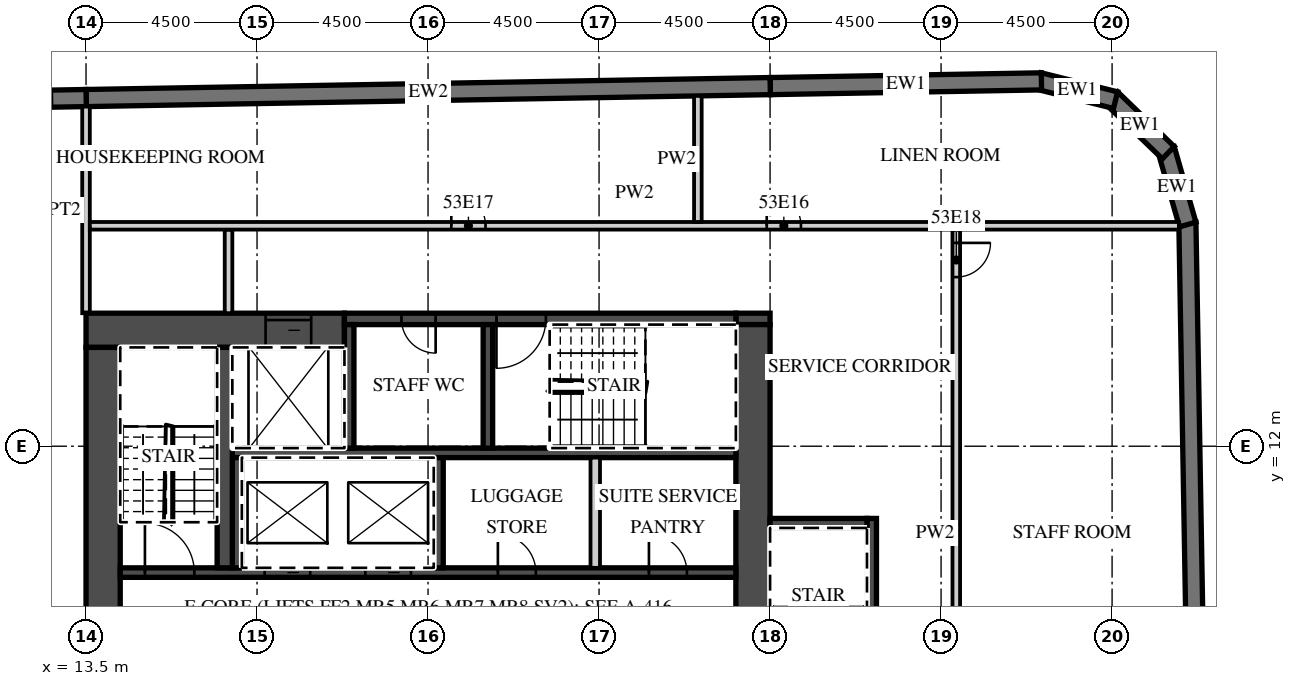
"""IFC4 building model, lengths in metres.
Left out: names, types, materials, properties, quantities, classifications, styles, units other than length and angle.
Written with IfcOpenShell. Run it as: python <this file> out.ifc"""

import sys

from ifc_helpers import new_model, si_unit, direction, frame, frame_2d, origin, place, context, subcontext, project, spatial, polyline, rectangle, outline, extrude, element, fill, save


model = new_model("IFC4")
c1 = context("Model", 3, precision=1e-05, world=origin(), true_north=direction((0.0, 1.0)))
c2 = subcontext(c1, "Body", "Model", "MODEL_VIEW")
j1 = project(units=[si_unit("LENGTHUNIT", "METRE"), si_unit("PLANEANGLEUNIT", "RADIAN")], contexts=[c1])
p1 = place(None, origin())
s1 = spatial("IfcSite", under=j1, at=p1, CompositionType="ELEMENT")
p2 = place(p1, origin())
s2 = spatial("IfcBuilding", under=s1, at=p2, CompositionType="ELEMENT")
p3 = place(p2, frame((0.0, 0.0, 221.0)))
s3 = spatial("IfcBuildingStorey", under=s2, at=p3, CompositionType="ELEMENT", Elevation=221.0)
p4 = place(p3, frame((43.057, -15.103, 0.0), z_axis=(0.0, 0.0, 1.0), x_axis=(-0.017452408953, 0.999847695112, 0.0)))
e1 = element("IfcWall", 1, at=p4, inside=s3, PredefinedType="SOLIDWALL", context=c2, shape_type="SweptSolid", body=[
    extrude(rectangle(XDim=33.0, YDim=0.45, at=frame_2d((16.5, 0.0))), origin(), (0.0, 0.0, 1.0), 3.02),
])
p5 = place(p3, frame((42.49, 17.833, 0.0), z_axis=(0.0, 0.0, 1.0), x_axis=(-0.275546368831, 0.961287781377, 0.0)))
e2 = element("IfcWall", 2, at=p5, inside=s3, PredefinedType="SOLIDWALL", context=c2, shape_type="SweptSolid", body=[
    extrude(outline(polyline([(0.0, -0.225), (2.071, -0.225), (1.95, 0.225), (0.121, 0.225), (0.0, -0.225)])), origin(), (0.0, 0.0, 1.0), 3.02),
])
p6 = place(p3, frame((41.979, 19.724, 0.0), z_axis=(0.0, 0.0, 1.0), x_axis=(-0.719379111448, 0.694617660308, 0.0)))
e3 = element("IfcWall", 3, at=p6, inside=s3, PredefinedType="SOLIDWALL", context=c2, shape_type="SweptSolid", body=[
    extrude(outline(polyline([(0.0, -0.225), (2.071, -0.225), (1.95, 0.225), (0.121, 0.225), (0.0, -0.225)])), origin(), (0.0, 0.0, 1.0), 3.02),
])
p7 = place(p3, frame((40.591, 21.106, 0.0), z_axis=(0.0, 0.0, 1.0), x_axis=(-0.970287979719, 0.241952963225, 0.0)))
e4 = element("IfcWall", 4, at=p7, inside=s3, PredefinedType="SOLIDWALL", context=c2, shape_type="SweptSolid", body=[
    extrude(outline(polyline([(0.0, -0.225), (2.071, -0.225), (1.95, 0.225), (0.121, 0.225), (0.0, -0.225)])), origin(), (0.0, 0.0, 1.0), 3.02),
])
p8 = place(p3, frame((38.641, 21.6, 0.0), z_axis=(0.0, 0.0, 1.0), x_axis=(-0.999847245074, -0.017478172627, 0.0)))
e5 = element("IfcWall", 5, at=p8, inside=s3, PredefinedType="SOLIDWALL", context=c2, shape_type="SweptSolid", body=[
    extrude(rectangle(XDim=7.138, YDim=0.45, at=frame_2d((3.569, 0.0))), origin(), (0.0, 0.0, 1.0), 3.02),
])
p9 = place(p3, frame((31.504, 21.476, 0.0), z_axis=(0.0, 0.0, 1.0), x_axis=(-0.999847677887, -0.017453395744, 0.0)))
e6 = element("IfcWall", 6, at=p9, inside=s3, PredefinedType="SOLIDWALL", context=c2, shape_type="SweptSolid", body=[
    extrude(rectangle(XDim=18.003, YDim=0.45, at=frame_2d((9.001, 0.0))), origin(), (0.0, 0.0, 1.0), 3.02),
])
p10 = place(p3, frame((13.504, 21.161, 0.0), z_axis=(0.0, 0.0, 1.0), x_axis=(-0.999847763257, -0.017448504532, 0.0)))
e7 = element("IfcWall", 7, at=p10, inside=s3, PredefinedType="SOLIDWALL", context=c2, shape_type="SweptSolid", body=[
    extrude(rectangle(XDim=46.859, YDim=0.45, at=frame_2d((23.43, 0.0))), origin(), (0.0, 0.0, 1.0), 3.02),
])
p11 = place(p10, frame((0.9, 0.0, 0.45)))
e8 = element("IfcOpeningElement", 8, at=p11, cuts=e7, PredefinedType="OPENING", context=c2, shape_type="SweptSolid", body=[
    extrude(rectangle(XDim=2.7, YDim=2.25, at=frame_2d((1.35, 1.125))), frame((0.0, 0.235, 0.0), z_axis=(0.0, -1.0, 0.0), x_axis=(1.0, 0.0, 0.0)), (0.0, 0.0, 1.0), 0.47),
])
p12 = place(p10, frame((5.401, 0.0, 0.45)))
e9 = element("IfcOpeningElement", 9, at=p12, cuts=e7, PredefinedType="OPENING", context=c2, shape_type="SweptSolid", body=[
    extrude(rectangle(XDim=2.7, YDim=2.25, at=frame_2d((1.35, 1.125))), frame((0.0, 0.235, 0.0), z_axis=(0.0, -1.0, 0.0), x_axis=(1.0, 0.0, 0.0)), (0.0, 0.0, 1.0), 0.47),
])
p13 = place(p10, frame((9.902, 0.0, 0.45)))
e10 = element("IfcOpeningElement", 10, at=p13, cuts=e7, PredefinedType="OPENING", context=c2, shape_type="SweptSolid", body=[
    extrude(rectangle(XDim=2.7, YDim=2.25, at=frame_2d((1.35, 1.125))), frame((0.0, 0.235, 0.0), z_axis=(0.0, -1.0, 0.0), x_axis=(1.0, 0.0, 0.0)), (0.0, 0.0, 1.0), 0.47),
])
p14 = place(p10, frame((14.402, 0.0, 0.45)))
e11 = element("IfcOpeningElement", 11, at=p14, cuts=e7, PredefinedType="OPENING", context=c2, shape_type="SweptSolid", body=[
    extrude(rectangle(XDim=2.7, YDim=2.25, at=frame_2d((1.35, 1.125))), frame((0.0, 0.235, 0.0), z_axis=(0.0, -1.0, 0.0), x_axis=(1.0, 0.0, 0.0)), (0.0, 0.0, 1.0), 0.47),
])
p15 = place(p10, frame((18.903, 0.0, 0.45)))
e12 = element("IfcOpeningElement", 12, at=p15, cuts=e7, PredefinedType="OPENING", context=c2, shape_type="SweptSolid", body=[
    extrude(rectangle(XDim=2.7, YDim=2.25, at=frame_2d((1.35, 1.125))), frame((0.0, 0.235, 0.0), z_axis=(0.0, -1.0, 0.0), x_axis=(1.0, 0.0, 0.0)), (0.0, 0.0, 1.0), 0.47),
])
p16 = place(p10, frame((23.404, 0.0, 0.45)))
e13 = element("IfcOpeningElement", 13, at=p16, cuts=e7, PredefinedType="OPENING", context=c2, shape_type="SweptSolid", body=[
    extrude(rectangle(XDim=2.7, YDim=2.25, at=frame_2d((1.35, 1.125))), frame((0.0, 0.235, 0.0), z_axis=(0.0, -1.0, 0.0), x_axis=(1.0, 0.0, 0.0)), (0.0, 0.0, 1.0), 0.47),
])
p17 = place(p10, frame((27.904, 0.0, 0.45)))
e14 = element("IfcOpeningElement", 14, at=p17, cuts=e7, PredefinedType="OPENING", context=c2, shape_type="SweptSolid", body=[
    extrude(rectangle(XDim=2.7, YDim=2.25, at=frame_2d((1.35, 1.125))), frame((0.0, 0.235, 0.0), z_axis=(0.0, -1.0, 0.0), x_axis=(1.0, 0.0, 0.0)), (0.0, 0.0, 1.0), 0.47),
])
p18 = place(p10, frame((32.405, 0.0, 0.45)))
e15 = element("IfcOpeningElement", 15, at=p18, cuts=e7, PredefinedType="OPENING", context=c2, shape_type="SweptSolid", body=[
    extrude(rectangle(XDim=2.7, YDim=2.25, at=frame_2d((1.35, 1.125))), frame((0.0, 0.235, 0.0), z_axis=(0.0, -1.0, 0.0), x_axis=(1.0, 0.0, 0.0)), (0.0, 0.0, 1.0), 0.47),
])
p19 = place(p10, frame((36.906, 0.0, 0.45)))
e16 = element("IfcOpeningElement", 16, at=p19, cuts=e7, PredefinedType="OPENING", context=c2, shape_type="SweptSolid", body=[
    extrude(rectangle(XDim=2.7, YDim=2.25, at=frame_2d((1.35, 1.125))), frame((0.0, 0.235, 0.0), z_axis=(0.0, -1.0, 0.0), x_axis=(1.0, 0.0, 0.0)), (0.0, 0.0, 1.0), 0.47),
])
p20 = place(p10, frame((41.406, 0.0, 0.45)))
e17 = element("IfcOpeningElement", 17, at=p20, cuts=e7, PredefinedType="OPENING", context=c2, shape_type="SweptSolid", body=[
    extrude(rectangle(XDim=2.7, YDim=2.25, at=frame_2d((1.35, 1.125))), frame((0.0, 0.235, 0.0), z_axis=(0.0, -1.0, 0.0), x_axis=(1.0, 0.0, 0.0)), (0.0, 0.0, 1.0), 0.47),
])
p21 = place(p3, frame((13.5, 15.5, 0.0), z_axis=(0.0, 0.0, 1.0), x_axis=(0.0, 1.0, 0.0)))
e18 = element("IfcWall", 18, at=p21, inside=s3, PredefinedType="PARTITIONING", context=c2, shape_type="SweptSolid", body=[
    extrude(rectangle(XDim=5.436, YDim=0.2, at=frame_2d((2.718, 0.0))), origin(), (0.0, 0.0, 1.0), 3.02),
])
p22 = place(p3, frame((13.5, 15.05, 0.0), z_axis=(0.0, 0.0, 1.0), x_axis=(1.0, 0.0, 0.0)))
e19 = element("IfcWall", 19, at=p22, inside=s3, PredefinedType="SHEAR", context=c2, shape_type="SweptSolid", body=[
    extrude(rectangle(XDim=6.8, YDim=0.9, at=frame_2d((3.4, 0.0))), origin(), (0.0, 0.0, 1.0), 3.02),
])
p23 = place(p22, frame((4.725, 0.0, 0.0)))
e20 = element("IfcOpeningElement", 20, at=p23, cuts=e19, PredefinedType="OPENING", context=c2, shape_type="SweptSolid", body=[
    extrude(rectangle(XDim=1.2, YDim=2.1, at=frame_2d((0.6, 1.05))), frame((0.0, 0.46, 0.0), z_axis=(0.0, -1.0, 0.0), x_axis=(1.0, 0.0, 0.0)), (0.0, 0.0, 1.0), 0.92),
])
p24 = place(p3, frame((30.6, 15.35, 0.0), z_axis=(0.0, 0.0, 1.0), x_axis=(1.0, 0.0, 0.0)))
e21 = element("IfcWall", 21, at=p24, inside=s3, PredefinedType="SHEAR", context=c2, shape_type="SweptSolid", body=[
    extrude(rectangle(XDim=0.9, YDim=0.3, at=frame_2d((0.45, 0.0))), origin(), (0.0, 0.0, 1.0), 3.02),
])
p25 = place(p3, frame((20.3, 15.35, 0.0), z_axis=(0.0, 0.0, 1.0), x_axis=(1.0, 0.0, 0.0)))
e22 = element("IfcWall", 22, at=p25, inside=s3, PredefinedType="SHEAR", context=c2, shape_type="SweptSolid", body=[
    extrude(rectangle(XDim=10.3, YDim=0.3, at=frame_2d((5.15, 0.0))), origin(), (0.0, 0.0, 1.0), 3.02),
])
p26 = place(p25, frame((4.0, 0.0, 0.0)))
e23 = element("IfcOpeningElement", 23, at=p26, cuts=e22, PredefinedType="OPENING", context=c2, shape_type="SweptSolid", body=[
    extrude(rectangle(XDim=1.3, YDim=2.1, at=frame_2d((0.65, 1.05))), frame((0.0, 0.16, 0.0), z_axis=(0.0, -1.0, 0.0), x_axis=(1.0, 0.0, 0.0)), (0.0, 0.0, 1.0), 0.32),
])
p27 = place(p25, frame((1.5, 0.0, 0.0)))
e24 = element("IfcOpeningElement", 24, at=p27, cuts=e22, PredefinedType="OPENING", context=c2, shape_type="SweptSolid", body=[
    extrude(rectangle(XDim=0.9, YDim=2.1, at=frame_2d((0.45, 1.05))), frame((0.0, 0.16, 0.0), z_axis=(0.0, -1.0, 0.0), x_axis=(1.0, 0.0, 0.0)), (0.0, 0.0, 1.0), 0.32),
])
p28 = place(p3, frame((31.05, 2.4, 0.0), z_axis=(0.0, 0.0, 1.0), x_axis=(0.0, 1.0, 0.0)))
e25 = element("IfcWall", 25, at=p28, inside=s3, PredefinedType="SHEAR", context=c2, shape_type="SweptSolid", body=[
    extrude(rectangle(XDim=12.8, YDim=0.9, at=frame_2d((6.4, 0.0))), origin(), (0.0, 0.0, 1.0), 3.02),
])
p29 = place(p28, frame((0.2, 0.0, 0.0)))
e26 = element("IfcOpeningElement", 26, at=p29, cuts=e25, PredefinedType="OPENING", context=c2, shape_type="SweptSolid", body=[
    extrude(rectangle(XDim=1.1, YDim=2.1, at=frame_2d((0.55, 1.05))), frame((0.0, 0.46, 0.0), z_axis=(0.0, -1.0, 0.0), x_axis=(1.0, 0.0, 0.0)), (0.0, 0.0, 1.0), 0.92),
])
p30 = place(p3, frame((13.95, 2.4, 0.0), z_axis=(0.0, 0.0, 1.0), x_axis=(0.0, 1.0, 0.0)))
e27 = element("IfcWall", 27, at=p30, inside=s3, PredefinedType="SHEAR", context=c2, shape_type="SweptSolid", body=[
    extrude(rectangle(XDim=12.2, YDim=0.9, at=frame_2d((6.1, 0.0))), origin(), (0.0, 0.0, 1.0), 3.02),
])
p31 = place(p3, frame((14.4, 8.675, 0.0), z_axis=(0.0, 0.0, 1.0), x_axis=(1.0, 0.0, 0.0)))
e28 = element("IfcWall", 28, at=p31, inside=s3, PredefinedType="SHEAR", context=c2, shape_type="SweptSolid", body=[
    extrude(rectangle(XDim=16.2, YDim=0.25, at=frame_2d((8.1, 0.0))), origin(), (0.0, 0.0, 1.0), 3.02),
])
p32 = place(p31, frame((6.45, 0.0, 0.0)))
e29 = element("IfcOpeningElement", 29, at=p32, cuts=e28, PredefinedType="OPENING", context=c2, shape_type="SweptSolid", body=[
    extrude(rectangle(XDim=1.2, YDim=2.1, at=frame_2d((0.6, 1.05))), frame((0.0, 0.135, 0.0), z_axis=(0.0, -1.0, 0.0), x_axis=(1.0, 0.0, 0.0)), (0.0, 0.0, 1.0), 0.27),
])
p33 = place(p31, frame((3.8, 0.0, 0.0)))
e30 = element("IfcOpeningElement", 30, at=p33, cuts=e28, PredefinedType="OPENING", context=c2, shape_type="SweptSolid", body=[
    extrude(rectangle(XDim=1.2, YDim=2.1, at=frame_2d((0.6, 1.05))), frame((0.0, 0.135, 0.0), z_axis=(0.0, -1.0, 0.0), x_axis=(1.0, 0.0, 0.0)), (0.0, 0.0, 1.0), 0.27),
])
p34 = place(p31, frame((0.65, 0.0, 0.0)))
e31 = element("IfcOpeningElement", 31, at=p34, cuts=e28, PredefinedType="OPENING", context=c2, shape_type="SweptSolid", body=[
    extrude(rectangle(XDim=1.3, YDim=2.1, at=frame_2d((0.65, 1.05))), frame((0.0, 0.135, 0.0), z_axis=(0.0, -1.0, 0.0), x_axis=(1.0, 0.0, 0.0)), (0.0, 0.0, 1.0), 0.27),
])
p35 = place(p31, frame((13.913, 0.0, 0.0)))
e32 = element("IfcOpeningElement", 32, at=p35, cuts=e28, PredefinedType="OPENING", context=c2, shape_type="SweptSolid", body=[
    extrude(rectangle(XDim=1.0, YDim=2.1, at=frame_2d((0.5, 1.05))), frame((0.0, 0.135, 0.0), z_axis=(0.0, -1.0, 0.0), x_axis=(1.0, 0.0, 0.0)), (0.0, 0.0, 1.0), 0.27),
])
p36 = place(p31, frame((9.938, 0.0, 0.0)))
e33 = element("IfcOpeningElement", 33, at=p36, cuts=e28, PredefinedType="OPENING", context=c2, shape_type="SweptSolid", body=[
    extrude(rectangle(XDim=1.0, YDim=2.1, at=frame_2d((0.5, 1.05))), frame((0.0, 0.135, 0.0), z_axis=(0.0, -1.0, 0.0), x_axis=(1.0, 0.0, 0.0)), (0.0, 0.0, 1.0), 0.27),
])
p37 = place(p3, frame((17.35, 11.825, 0.0), z_axis=(0.0, 0.0, 1.0), x_axis=(1.0, 0.0, 0.0)))
e34 = element("IfcWall", 34, at=p37, inside=s3, PredefinedType="SHEAR", context=c2, shape_type="SweptSolid", body=[
    extrude(rectangle(XDim=13.25, YDim=0.25, at=frame_2d((6.625, 0.0))), origin(), (0.0, 0.0, 1.0), 3.02),
])
for number, where, z_axis, x_axis in (
    (35, (17.475, 8.8, 0.0), (0.0, 0.0, 1.0), (0.0, 1.0, 0.0)),
    (36, (22.775, 8.8, 0.0), (0.0, 0.0, 1.0), (0.0, 1.0, 0.0)),
):
    element("IfcWall", number, at=place(p3, frame(where, z_axis=z_axis, x_axis=x_axis)), inside=s3, PredefinedType="SHEAR", context=c2, shape_type="SweptSolid", body=[
        extrude(rectangle(XDim=2.9, YDim=0.25, at=frame_2d((1.45, 0.0))), origin(), (0.0, 0.0, 1.0), 3.02),
    ])
p38 = place(p3, frame((26.9, 8.8, 0.0), z_axis=(0.0, 0.0, 1.0), x_axis=(0.0, 1.0, 0.0)))
e37 = element("IfcWall", 37, at=p38, inside=s3, PredefinedType="PARTITIONING", context=c2, shape_type="SweptSolid", body=[
    extrude(rectangle(XDim=2.9, YDim=0.25, at=frame_2d((1.45, 0.0))), origin(), (0.0, 0.0, 1.0), 3.02),
])
p39 = place(p3, frame((17.15, 8.8, 0.0), z_axis=(0.0, 0.0, 1.0), x_axis=(0.0, 1.0, 0.0)))
e38 = element("IfcWall", 38, at=p39, inside=s3, PredefinedType="SHEAR", context=c2, shape_type="SweptSolid", body=[
    extrude(rectangle(XDim=5.8, YDim=0.4, at=frame_2d((2.9, 0.0))), origin(), (0.0, 0.0, 1.0), 3.02),
])
for number, where, z_axis, x_axis in (
    (39, (20.425, 11.95, 0.0), (0.0, 0.0, 1.0), (0.0, 1.0, 0.0)),
    (40, (24.075, 11.95, 0.0), (0.0, 0.0, 1.0), (0.0, 1.0, 0.0)),
):
    element("IfcWall", number, at=place(p3, frame(where, z_axis=z_axis, x_axis=x_axis)), inside=s3, PredefinedType="SHEAR", context=c2, shape_type="SweptSolid", body=[
        extrude(rectangle(XDim=3.25, YDim=0.25, at=frame_2d((1.625, 0.0))), origin(), (0.0, 0.0, 1.0), 3.02),
    ])
p40 = place(p3, frame((34.175, 1.75, 0.0), z_axis=(0.0, 0.0, 1.0), x_axis=(0.0, 1.0, 0.0)))
e41 = element("IfcWall", 41, at=p40, inside=s3, PredefinedType="SHEAR", context=c2, shape_type="SweptSolid", body=[
    extrude(rectangle(XDim=8.35, YDim=0.25, at=frame_2d((4.175, 0.0))), origin(), (0.0, 0.0, 1.0), 3.02),
])
p41 = place(p3, frame((31.5, 9.975, 0.0), z_axis=(0.0, 0.0, 1.0), x_axis=(1.0, 0.0, 0.0)))
e42 = element("IfcWall", 42, at=p41, inside=s3, PredefinedType="SHEAR", context=c2, shape_type="SweptSolid", body=[
    extrude(rectangle(XDim=2.55, YDim=0.25, at=frame_2d((1.275, 0.0))), origin(), (0.0, 0.0, 1.0), 3.02),
])
p42 = place(p3, frame((17.25, 15.5, 0.0), z_axis=(0.0, 0.0, 1.0), x_axis=(0.0, 1.0, 0.0)))
e43 = element("IfcWall", 43, at=p42, inside=s3, PredefinedType="PARTITIONING", context=c2, shape_type="SweptSolid", body=[
    extrude(rectangle(XDim=2.2, YDim=0.2, at=frame_2d((1.1, 0.0))), origin(), (0.0, 0.0, 1.0), 3.02),
])
p43 = place(p3, frame((36.4, 1.75, 0.0), z_axis=(0.0, 0.0, 1.0), x_axis=(0.0, 1.0, 0.0)))
e44 = element("IfcWall", 44, at=p43, inside=s3, PredefinedType="PARTITIONING", context=c2, shape_type="SweptSolid", body=[
    extrude(rectangle(XDim=15.95, YDim=0.2, at=frame_2d((7.975, 0.0))), origin(), (0.0, 0.0, 1.0), 3.02),
])
p44 = place(p43, frame((14.7, 0.0, 0.0)))
e45 = element("IfcOpeningElement", 45, at=p44, cuts=e44, PredefinedType="OPENING", context=c2, shape_type="SweptSolid", body=[
    extrude(rectangle(XDim=0.9, YDim=2.1, at=frame_2d((0.45, 1.05))), frame((0.0, 0.11, 0.0), z_axis=(0.0, -1.0, 0.0), x_axis=(1.0, 0.0, 0.0)), (0.0, 0.0, 1.0), 0.22),
])
p45 = place(p3, frame((13.6, 17.8, 0.0), z_axis=(0.0, 0.0, 1.0), x_axis=(1.0, 0.0, 0.0)))
e46 = element("IfcWall", 46, at=p45, inside=s3, PredefinedType="PARTITIONING", context=c2, shape_type="SweptSolid", body=[
    extrude(rectangle(XDim=28.657, YDim=0.2, at=frame_2d((14.329, 0.0))), origin(), (0.0, 0.0, 1.0), 3.02),
])
p46 = place(p45, frame((17.812, 0.0, 0.0)))
e47 = element("IfcOpeningElement", 47, at=p46, cuts=e46, PredefinedType="OPENING", context=c2, shape_type="SweptSolid", body=[
    extrude(rectangle(XDim=0.9, YDim=2.1, at=frame_2d((0.45, 1.05))), frame((0.0, 0.11, 0.0), z_axis=(0.0, -1.0, 0.0), x_axis=(1.0, 0.0, 0.0)), (0.0, 0.0, 1.0), 0.22),
])
p47 = place(p45, frame((9.512, 0.0, 0.0)))
e48 = element("IfcOpeningElement", 48, at=p47, cuts=e46, PredefinedType="OPENING", context=c2, shape_type="SweptSolid", body=[
    extrude(rectangle(XDim=0.9, YDim=2.1, at=frame_2d((0.45, 1.05))), frame((0.0, 0.11, 0.0), z_axis=(0.0, -1.0, 0.0), x_axis=(1.0, 0.0, 0.0)), (0.0, 0.0, 1.0), 0.22),
])
p48 = place(p3, frame((29.6, 17.9, 0.0), z_axis=(0.0, 0.0, 1.0), x_axis=(0.0, 1.0, 0.0)))
e49 = element("IfcWall", 49, at=p48, inside=s3, PredefinedType="PARTITIONING", context=c2, shape_type="SweptSolid", body=[
    extrude(rectangle(XDim=3.318, YDim=0.2, at=frame_2d((1.659, 0.0))), origin(), (0.0, 0.0, 1.0), 3.02),
])
p49 = place(p11, origin())
e50 = element("IfcWindow", 50, at=p49, inside=s3, PartitioningType="SINGLE_PANEL", PredefinedType="WINDOW", context=c2, shape_type="SweptSolid", body=[
    extrude(rectangle(XDim=2.7, YDim=2.25, at=frame_2d((1.35, 1.125))), frame((0.0, 0.09, 0.0), z_axis=(0.0, -1.0, 0.0), x_axis=(1.0, 0.0, 0.0)), (0.0, 0.0, 1.0), 0.06),
])
fill(e8, e50)
p50 = place(p32, origin())
e51 = element("IfcDoor", 51, at=p50, inside=s3, OperationType="SLIDING_TO_LEFT", PredefinedType="DOOR", context=c2, shape_type="SweptSolid", body=[
    extrude(rectangle(XDim=1.2, YDim=2.1, at=frame_2d((0.6, 1.05))), frame((0.0, 0.025, 0.0), z_axis=(0.0, -1.0, 0.0), x_axis=(1.0, 0.0, 0.0)), (0.0, 0.0, 1.0), 0.05),
])
fill(e29, e51)
p51 = place(p33, origin())
e52 = element("IfcDoor", 52, at=p51, inside=s3, OperationType="SLIDING_TO_RIGHT", PredefinedType="DOOR", context=c2, shape_type="SweptSolid", body=[
    extrude(rectangle(XDim=1.2, YDim=2.1, at=frame_2d((0.6, 1.05))), frame((0.0, 0.025, 0.0), z_axis=(0.0, -1.0, 0.0), x_axis=(1.0, 0.0, 0.0)), (0.0, 0.0, 1.0), 0.05),
])
fill(e30, e52)
p52 = place(p23, origin())
e53 = element("IfcDoor", 53, at=p52, inside=s3, OperationType="SLIDING_TO_LEFT", PredefinedType="DOOR", context=c2, shape_type="SweptSolid", body=[
    extrude(rectangle(XDim=1.2, YDim=2.1, at=frame_2d((0.6, 1.05))), frame((0.0, 0.025, 0.0), z_axis=(0.0, -1.0, 0.0), x_axis=(1.0, 0.0, 0.0)), (0.0, 0.0, 1.0), 0.05),
])
fill(e20, e53)
p53 = place(p34, origin())
e54 = element("IfcDoor", 54, at=p53, inside=s3, OperationType="SINGLE_SWING_LEFT", PredefinedType="DOOR", context=c2, shape_type="SweptSolid", body=[
    extrude(rectangle(XDim=1.3, YDim=2.1, at=frame_2d((0.65, 1.05))), frame((0.0, 0.025, 0.0), z_axis=(0.0, -1.0, 0.0), x_axis=(1.0, 0.0, 0.0)), (0.0, 0.0, 1.0), 0.05),
])
fill(e31, e54)
p54 = place(p26, origin())
e55 = element("IfcDoor", 55, at=p54, inside=s3, OperationType="SINGLE_SWING_LEFT", PredefinedType="DOOR", context=c2, shape_type="SweptSolid", body=[
    extrude(rectangle(XDim=1.3, YDim=2.1, at=frame_2d((0.65, 1.05))), frame((0.0, 0.025, 0.0), z_axis=(0.0, -1.0, 0.0), x_axis=(1.0, 0.0, 0.0)), (0.0, 0.0, 1.0), 0.05),
])
fill(e23, e55)
p55 = place(p27, origin())
e56 = element("IfcDoor", 56, at=p55, inside=s3, OperationType="SINGLE_SWING_RIGHT", PredefinedType="DOOR", context=c2, shape_type="SweptSolid", body=[
    extrude(rectangle(XDim=0.9, YDim=2.1, at=frame_2d((0.45, 1.05))), frame((0.0, 0.025, 0.0), z_axis=(0.0, -1.0, 0.0), x_axis=(1.0, 0.0, 0.0)), (0.0, 0.0, 1.0), 0.05),
])
fill(e24, e56)
p56 = place(p35, origin())
e57 = element("IfcDoor", 57, at=p56, inside=s3, OperationType="SINGLE_SWING_LEFT", PredefinedType="DOOR", context=c2, shape_type="SweptSolid", body=[
    extrude(rectangle(XDim=1.0, YDim=2.1, at=frame_2d((0.5, 1.05))), frame((0.0, 0.025, 0.0), z_axis=(0.0, -1.0, 0.0), x_axis=(1.0, 0.0, 0.0)), (0.0, 0.0, 1.0), 0.05),
])
fill(e32, e57)
p57 = place(p36, origin())
e58 = element("IfcDoor", 58, at=p57, inside=s3, OperationType="SINGLE_SWING_LEFT", PredefinedType="DOOR", context=c2, shape_type="SweptSolid", body=[
    extrude(rectangle(XDim=1.0, YDim=2.1, at=frame_2d((0.5, 1.05))), frame((0.0, 0.025, 0.0), z_axis=(0.0, -1.0, 0.0), x_axis=(1.0, 0.0, 0.0)), (0.0, 0.0, 1.0), 0.05),
])
fill(e33, e58)
p58 = place(p46, origin())
e59 = element("IfcDoor", 59, at=p58, inside=s3, OperationType="SINGLE_SWING_LEFT", PredefinedType="DOOR", context=c2, shape_type="SweptSolid", body=[
    extrude(rectangle(XDim=0.9, YDim=2.1, at=frame_2d((0.45, 1.05))), frame((0.0, 0.025, 0.0), z_axis=(0.0, -1.0, 0.0), x_axis=(1.0, 0.0, 0.0)), (0.0, 0.0, 1.0), 0.05),
])
fill(e47, e59)
p59 = place(p47, origin())
e60 = element("IfcDoor", 60, at=p59, inside=s3, OperationType="SINGLE_SWING_LEFT", PredefinedType="DOOR", context=c2, shape_type="SweptSolid", body=[
    extrude(rectangle(XDim=0.9, YDim=2.1, at=frame_2d((0.45, 1.05))), frame((0.0, 0.025, 0.0), z_axis=(0.0, -1.0, 0.0), x_axis=(1.0, 0.0, 0.0)), (0.0, 0.0, 1.0), 0.05),
])
fill(e48, e60)
p60 = place(p44, origin())
e61 = element("IfcDoor", 61, at=p60, inside=s3, OperationType="SINGLE_SWING_RIGHT", PredefinedType="DOOR", context=c2, shape_type="SweptSolid", body=[
    extrude(rectangle(XDim=0.9, YDim=2.1, at=frame_2d((0.45, 1.05))), frame((0.0, 0.025, 0.0), z_axis=(0.0, -1.0, 0.0), x_axis=(1.0, 0.0, 0.0)), (0.0, 0.0, 1.0), 0.05),
])
fill(e45, e61)
save(model, sys.argv[1])
